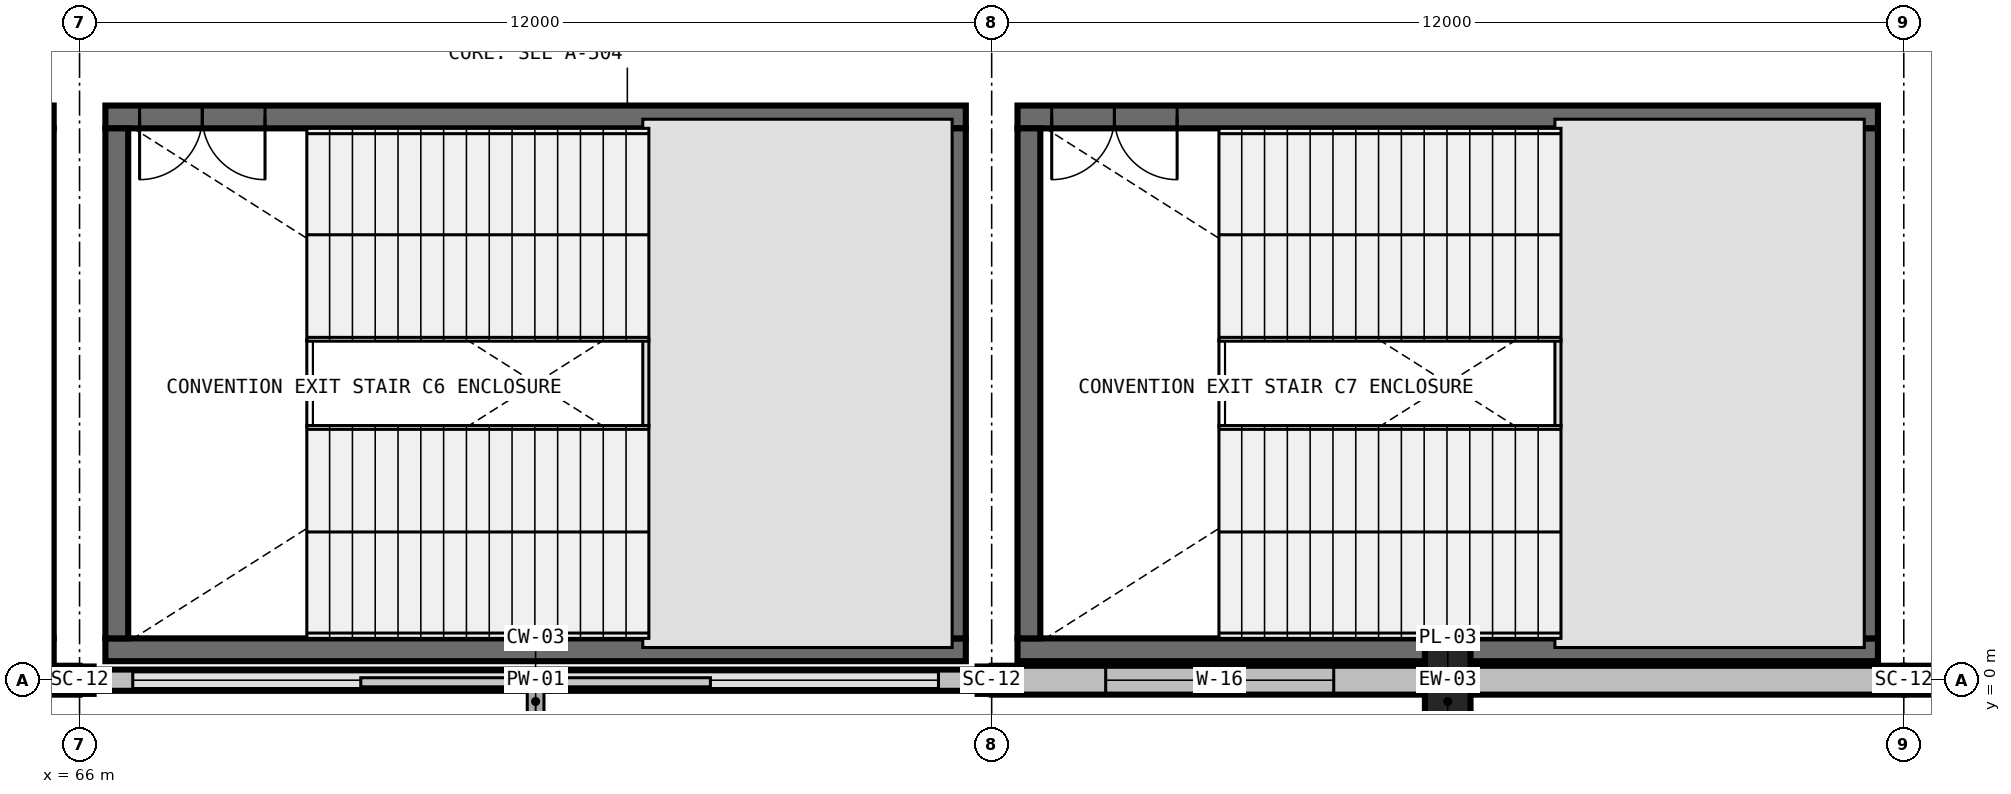
"""IFC4 building model, lengths in metres.
Left out: names, types, materials, properties, quantities, classifications, styles, units other than length and angle.
Written with IfcOpenShell. Run it as: python <this file> out.ifc"""

import sys

from ifc_helpers import new_model, si_unit, direction, frame, frame_2d, origin, origin_2d, place, context, subcontext, project, spatial, rectangle, i_section, extrude, element, fill, save


model = new_model("IFC4")
c1 = context("Model", 3, precision=1e-05, world=origin(), true_north=direction((0.0, 1.0)))
c2 = subcontext(c1, "Body", "Model", "MODEL_VIEW")
j1 = project(units=[si_unit("LENGTHUNIT", "METRE"), si_unit("PLANEANGLEUNIT", "RADIAN")], contexts=[c1])
p1 = place(None, origin())
s1 = spatial("IfcSite", under=j1, at=p1, CompositionType="ELEMENT")
p2 = place(p1, origin())
s2 = spatial("IfcBuilding", under=s1, at=p2, CompositionType="ELEMENT")
p3 = place(p2, frame((0.0, 0.0, 18.0)))
s3 = spatial("IfcBuildingStorey", under=s2, at=p3, CompositionType="ELEMENT", Elevation=18.0)
for number, where, z_axis, x_axis in (
    (1, (66.0, 0.0, 0.0), (0.0, 0.0, 1.0), (1.0, 0.0, 0.0)),
    (2, (78.0, 0.0, 0.0), (0.0, 0.0, 1.0), (1.0, 0.0, 0.0)),
    (3, (90.0, 0.0, 0.0), (0.0, 0.0, 1.0), (1.0, 0.0, 0.0)),
):
    element("IfcColumn", number, at=place(p3, frame(where, z_axis=z_axis, x_axis=x_axis)), inside=s3, PredefinedType="COLUMN", context=c2, shape_type="SweptSolid", body=[
        extrude(i_section(OverallWidth=0.37, OverallDepth=0.36, WebThickness=0.012, FlangeThickness=0.02, FilletRadius=0.031, at=origin_2d()), origin(), (0.0, 0.0, 1.0), 5.4),
    ])
p4 = place(p3, frame((84.0, 0.0, 0.0), z_axis=(0.0, 0.0, 1.0), x_axis=(1.0, 0.0, 0.0)))
e4 = element("IfcColumn", 4, at=p4, inside=s3, PredefinedType="PILASTER", context=c2, shape_type="SweptSolid", body=[
    extrude(rectangle(XDim=0.6, YDim=1.0, at=origin_2d()), origin(), (0.0, 0.0, 1.0), 5.4),
])
p5 = place(p3, frame((65.66, 0.4, 0.0), z_axis=(0.0, 0.0, 1.0), x_axis=(-1.0, 0.0, 0.0)))
e5 = element("IfcWall", 5, at=p5, inside=s3, PredefinedType="SHEAR", context=c2, shape_type="SweptSolid", body=[
    extrude(rectangle(XDim=11.32, YDim=0.3, at=frame_2d((5.66, 0.0))), origin(), (0.0, 0.0, 1.0), 5.4),
])
p6 = place(p3, frame((65.66, 7.41, 0.0), z_axis=(0.0, 0.0, 1.0), x_axis=(-1.0, 0.0, 0.0)))
e6 = element("IfcWall", 6, at=p6, inside=s3, PredefinedType="SHEAR", context=c2, shape_type="SweptSolid", body=[
    extrude(rectangle(XDim=11.32, YDim=0.3, at=frame_2d((5.66, 0.0))), origin(), (0.0, 0.0, 1.0), 5.4),
])
p7 = place(p6, frame((9.22, 0.0, 0.0)))
e7 = element("IfcOpeningElement", 7, at=p7, cuts=e6, PredefinedType="OPENING", context=c2, shape_type="SweptSolid", body=[
    extrude(rectangle(XDim=1.65, YDim=2.25, at=frame_2d((0.825, 1.125))), frame((0.0, 0.165, 0.0), z_axis=(0.0, -1.0, 0.0), x_axis=(1.0, 0.0, 0.0)), (0.0, 0.0, 1.0), 0.33),
])
p8 = place(p3, frame((65.51, 0.55, 0.0), z_axis=(0.0, 0.0, 1.0), x_axis=(0.0, 1.0, 0.0)))
e8 = element("IfcWall", 8, at=p8, inside=s3, PredefinedType="SHEAR", context=c2, shape_type="SweptSolid", body=[
    extrude(rectangle(XDim=6.71, YDim=0.3, at=frame_2d((3.355, 0.0))), origin(), (0.0, 0.0, 1.0), 5.4),
])
p9 = place(p3, frame((77.66, 0.4, 0.0), z_axis=(0.0, 0.0, 1.0), x_axis=(-1.0, 0.0, 0.0)))
e9 = element("IfcWall", 9, at=p9, inside=s3, PredefinedType="SHEAR", context=c2, shape_type="SweptSolid", body=[
    extrude(rectangle(XDim=11.32, YDim=0.3, at=frame_2d((5.66, 0.0))), origin(), (0.0, 0.0, 1.0), 5.4),
])
p10 = place(p3, frame((77.66, 7.41, 0.0), z_axis=(0.0, 0.0, 1.0), x_axis=(-1.0, 0.0, 0.0)))
e10 = element("IfcWall", 10, at=p10, inside=s3, PredefinedType="SHEAR", context=c2, shape_type="SweptSolid", body=[
    extrude(rectangle(XDim=11.32, YDim=0.3, at=frame_2d((5.66, 0.0))), origin(), (0.0, 0.0, 1.0), 5.4),
])
p11 = place(p10, frame((9.22, 0.0, 0.0)))
e11 = element("IfcOpeningElement", 11, at=p11, cuts=e10, PredefinedType="OPENING", context=c2, shape_type="SweptSolid", body=[
    extrude(rectangle(XDim=1.65, YDim=2.25, at=frame_2d((0.825, 1.125))), frame((0.0, 0.165, 0.0), z_axis=(0.0, -1.0, 0.0), x_axis=(1.0, 0.0, 0.0)), (0.0, 0.0, 1.0), 0.33),
])
for number, where, z_axis, x_axis in (
    (12, (66.49, 7.26, 0.0), (0.0, 0.0, 1.0), (0.0, -1.0, 0.0)),
    (13, (77.51, 0.55, 0.0), (0.0, 0.0, 1.0), (0.0, 1.0, 0.0)),
):
    element("IfcWall", number, at=place(p3, frame(where, z_axis=z_axis, x_axis=x_axis)), inside=s3, PredefinedType="SHEAR", context=c2, shape_type="SweptSolid", body=[
        extrude(rectangle(XDim=6.71, YDim=0.3, at=frame_2d((3.355, 0.0))), origin(), (0.0, 0.0, 1.0), 5.4),
    ])
p12 = place(p3, frame((89.66, 0.4, 0.0), z_axis=(0.0, 0.0, 1.0), x_axis=(-1.0, 0.0, 0.0)))
e14 = element("IfcWall", 14, at=p12, inside=s3, PredefinedType="SHEAR", context=c2, shape_type="SweptSolid", body=[
    extrude(rectangle(XDim=11.32, YDim=0.3, at=frame_2d((5.66, 0.0))), origin(), (0.0, 0.0, 1.0), 5.4),
])
p13 = place(p3, frame((89.66, 7.41, 0.0), z_axis=(0.0, 0.0, 1.0), x_axis=(-1.0, 0.0, 0.0)))
e15 = element("IfcWall", 15, at=p13, inside=s3, PredefinedType="SHEAR", context=c2, shape_type="SweptSolid", body=[
    extrude(rectangle(XDim=11.32, YDim=0.3, at=frame_2d((5.66, 0.0))), origin(), (0.0, 0.0, 1.0), 5.4),
])
p14 = place(p13, frame((9.22, 0.0, 0.0)))
e16 = element("IfcOpeningElement", 16, at=p14, cuts=e15, PredefinedType="OPENING", context=c2, shape_type="SweptSolid", body=[
    extrude(rectangle(XDim=1.65, YDim=2.25, at=frame_2d((0.825, 1.125))), frame((0.0, 0.165, 0.0), z_axis=(0.0, -1.0, 0.0), x_axis=(1.0, 0.0, 0.0)), (0.0, 0.0, 1.0), 0.33),
])
for number, where, z_axis, x_axis in (
    (17, (78.49, 7.26, 0.0), (0.0, 0.0, 1.0), (0.0, -1.0, 0.0)),
    (18, (89.51, 0.55, 0.0), (0.0, 0.0, 1.0), (0.0, 1.0, 0.0)),
):
    element("IfcWall", number, at=place(p3, frame(where, z_axis=z_axis, x_axis=x_axis)), inside=s3, PredefinedType="SHEAR", context=c2, shape_type="SweptSolid", body=[
        extrude(rectangle(XDim=6.71, YDim=0.3, at=frame_2d((3.355, 0.0))), origin(), (0.0, 0.0, 1.0), 5.4),
    ])
p15 = place(p3, frame((54.0, 0.0, 0.0), z_axis=(0.0, 0.0, 1.0), x_axis=(1.0, 0.0, 0.0)))
e19 = element("IfcWall", 19, at=p15, inside=s3, PredefinedType="STANDARD", context=c2, shape_type="SweptSolid", body=[
    extrude(rectangle(XDim=12.0, YDim=0.38, at=frame_2d((6.0, 0.0))), origin(), (0.0, 0.0, 1.0), 4.176),
])
p16 = place(p15, frame((1.5, 0.0, 0.85)))
e20 = element("IfcOpeningElement", 20, at=p16, cuts=e19, PredefinedType="OPENING", context=c2, shape_type="SweptSolid", body=[
    extrude(rectangle(XDim=2.2, YDim=1.95, at=frame_2d((1.1, 0.975))), frame((0.0, 0.205, 0.0), z_axis=(0.0, -1.0, 0.0), x_axis=(1.0, 0.0, 0.0)), (0.0, 0.0, 1.0), 0.41),
])
p17 = place(p3, frame((66.0, 0.0, 0.0), z_axis=(0.0, 0.0, 1.0), x_axis=(1.0, 0.0, 0.0)))
e21 = element("IfcWall", 21, at=p17, inside=s3, PredefinedType="PARAPET", context=c2, shape_type="SweptSolid", body=[
    extrude(rectangle(XDim=12.0, YDim=0.28, at=frame_2d((6.0, 0.0))), origin(), (0.0, 0.0, 1.0), 0.2),
])
p18 = place(p3, frame((78.0, 0.0, 0.0), z_axis=(0.0, 0.0, 1.0), x_axis=(1.0, 0.0, 0.0)))
e22 = element("IfcWall", 22, at=p18, inside=s3, PredefinedType="STANDARD", context=c2, shape_type="SweptSolid", body=[
    extrude(rectangle(XDim=12.0, YDim=0.38, at=frame_2d((6.0, 0.0))), origin(), (0.0, 0.0, 1.0), 4.176),
])
p19 = place(p18, frame((1.5, 0.0, 0.85)))
e23 = element("IfcOpeningElement", 23, at=p19, cuts=e22, PredefinedType="OPENING", context=c2, shape_type="SweptSolid", body=[
    extrude(rectangle(XDim=3.0, YDim=2.3, at=frame_2d((1.5, 1.15))), frame((0.0, 0.205, 0.0), z_axis=(0.0, -1.0, 0.0), x_axis=(1.0, 0.0, 0.0)), (0.0, 0.0, 1.0), 0.41),
])
p20 = place(p3, frame((90.0, 0.0, 0.0), z_axis=(0.0, 0.0, 1.0), x_axis=(1.0, 0.0, 0.0)))
e24 = element("IfcWall", 24, at=p20, inside=s3, PredefinedType="STANDARD", context=c2, shape_type="SweptSolid", body=[
    extrude(rectangle(XDim=6.0, YDim=0.38, at=frame_2d((3.0, 0.0))), origin(), (0.0, 0.0, 1.0), 4.176),
])
p21 = place(p11, origin())
e25 = element("IfcDoor", 25, at=p21, inside=s3, OperationType="DOUBLE_DOOR_SINGLE_SWING", PredefinedType="DOOR", context=c2, shape_type="SweptSolid", body=[
    extrude(rectangle(XDim=1.65, YDim=2.25, at=frame_2d((0.825, 1.125))), frame((0.0, 0.025, 0.0), z_axis=(0.0, -1.0, 0.0), x_axis=(1.0, 0.0, 0.0)), (0.0, 0.0, 1.0), 0.05),
])
fill(e11, e25)
p22 = place(p14, origin())
e26 = element("IfcDoor", 26, at=p22, inside=s3, OperationType="DOUBLE_DOOR_SINGLE_SWING", PredefinedType="DOOR", context=c2, shape_type="SweptSolid", body=[
    extrude(rectangle(XDim=1.65, YDim=2.25, at=frame_2d((0.825, 1.125))), frame((0.0, 0.025, 0.0), z_axis=(0.0, -1.0, 0.0), x_axis=(1.0, 0.0, 0.0)), (0.0, 0.0, 1.0), 0.05),
])
fill(e16, e26)
p23 = place(p19, origin())
e27 = element("IfcWindow", 27, at=p23, inside=s3, PartitioningType="TRIPLE_PANEL_VERTICAL", PredefinedType="WINDOW", context=c2, shape_type="SweptSolid", body=[
    extrude(rectangle(XDim=3.0, YDim=2.3, at=frame_2d((1.5, 1.15))), frame((0.0, 0.03, 0.0), z_axis=(0.0, -1.0, 0.0), x_axis=(1.0, 0.0, 0.0)), (0.0, 0.0, 1.0), 0.06),
])
fill(e23, e27)
save(model, sys.argv[1])
